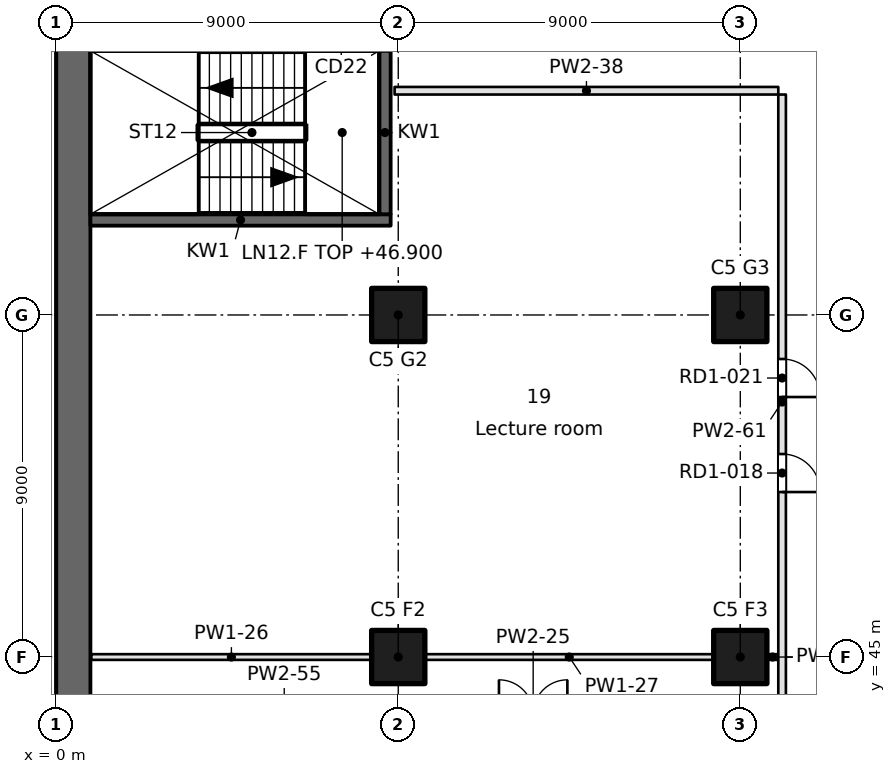
"""IFC4 building model, lengths in metres.
Left out: names, types, materials, properties, quantities, classifications, styles, units other than length and angle.
Written with IfcOpenShell. Run it as: python <this file> out.ifc"""

import sys

from ifc_helpers import new_model, si_unit, direction, frame, frame_2d, origin, origin_2d, place, context, subcontext, project, spatial, rectangle, extrude, element, fill, save


model = new_model("IFC4")
c1 = context("Model", 3, precision=1e-05, world=origin(), true_north=direction((0.0, 1.0)))
c2 = subcontext(c1, "Body", "Model", "MODEL_VIEW")
j1 = project(units=[si_unit("LENGTHUNIT", "METRE"), si_unit("PLANEANGLEUNIT", "RADIAN")], contexts=[c1])
p1 = place(None, origin())
s1 = spatial("IfcSite", under=j1, at=p1, CompositionType="ELEMENT")
p2 = place(p1, origin())
s2 = spatial("IfcBuilding", under=s1, at=p2, CompositionType="ELEMENT")
p3 = place(p2, frame((0.0, 0.0, 46.9)))
s3 = spatial("IfcBuildingStorey", under=s2, at=p3, CompositionType="ELEMENT", Elevation=46.9)
for number, where, z_axis, x_axis in (
    (1, (9.0, 45.0, 0.0), (0.0, 0.0, 1.0), (1.0, 0.0, 0.0)),
    (2, (9.0, 54.0, 0.0), (0.0, 0.0, 1.0), (1.0, 0.0, 0.0)),
    (3, (18.0, 45.0, 0.0), (0.0, 0.0, 1.0), (1.0, 0.0, 0.0)),
    (4, (18.0, 54.0, 0.0), (0.0, 0.0, 1.0), (1.0, 0.0, 0.0)),
):
    element("IfcColumn", number, at=place(p3, frame(where, z_axis=z_axis, x_axis=x_axis)), inside=s3, PredefinedType="COLUMN", context=c2, shape_type="SweptSolid", body=[
        extrude(rectangle(XDim=1.4, YDim=1.4, at=origin_2d()), origin(), (0.0, 0.0, 1.0), 3.7),
    ])
p4 = place(p3, frame((0.45, 94.5, 0.0), z_axis=(0.0, 0.0, 1.0), x_axis=(0.0, -1.0, 0.0)))
e5 = element("IfcWall", 5, at=p4, inside=s3, PredefinedType="SHEAR", context=c2, shape_type="SweptSolid", body=[
    extrude(rectangle(XDim=66.187, YDim=0.9, at=frame_2d((33.094, 0.0))), origin(), (0.0, 0.0, 1.0), 3.7),
])
p5 = place(p3, frame((0.9, 56.5, -0.4), z_axis=(0.0, 0.0, 1.0), x_axis=(1.0, 0.0, 0.0)))
e6 = element("IfcWall", 6, at=p5, inside=s3, PredefinedType="SOLIDWALL", context=c2, shape_type="SweptSolid", body=[
    extrude(rectangle(XDim=7.9, YDim=0.3, at=frame_2d((3.95, 0.0))), origin(), (0.0, 0.0, 1.0), 3.7),
])
p6 = place(p3, frame((8.65, 56.65, -0.4), z_axis=(0.0, 0.0, 1.0), x_axis=(0.0, 1.0, 0.0)))
e7 = element("IfcWall", 7, at=p6, inside=s3, PredefinedType="SOLIDWALL", context=c2, shape_type="SweptSolid", body=[
    extrude(rectangle(XDim=4.3, YDim=0.3, at=frame_2d((2.15, 0.0))), origin(), (0.0, 0.0, 1.0), 3.7),
])
p7 = place(p3, frame((0.92, 45.0, 0.0), z_axis=(0.0, 0.0, 1.0), x_axis=(1.0, 0.0, 0.0)))
e8 = element("IfcWall", 8, at=p7, inside=s3, PredefinedType="PARTITIONING", context=c2, shape_type="SweptSolid", body=[
    extrude(rectangle(XDim=7.38, YDim=0.15, at=frame_2d((3.69, 0.0))), origin(), (0.0, 0.0, 1.0), 3.3),
])
p8 = place(p3, frame((9.7, 45.0, 0.0), z_axis=(0.0, 0.0, 1.0), x_axis=(1.0, 0.0, 0.0)))
e9 = element("IfcWall", 9, at=p8, inside=s3, PredefinedType="PARTITIONING", context=c2, shape_type="SweptSolid", body=[
    extrude(rectangle(XDim=7.6, YDim=0.15, at=frame_2d((3.8, 0.0))), origin(), (0.0, 0.0, 1.0), 3.3),
])
p9 = place(p3, frame((18.7, 45.0, 0.0), z_axis=(0.0, 0.0, 1.0), x_axis=(1.0, 0.0, 0.0)))
e10 = element("IfcWall", 10, at=p9, inside=s3, PredefinedType="PARTITIONING", context=c2, shape_type="SweptSolid", body=[
    extrude(rectangle(XDim=0.3, YDim=0.15, at=frame_2d((0.15, 0.0))), origin(), (0.0, 0.0, 1.0), 3.3),
])
p10 = place(p3, frame((19.0, 59.9, 0.0), z_axis=(0.0, 0.0, 1.0), x_axis=(-1.0, 0.0, 0.0)))
e11 = element("IfcWall", 11, at=p10, inside=s3, PredefinedType="PARTITIONING", context=c2, shape_type="SweptSolid", body=[
    extrude(rectangle(XDim=10.096, YDim=0.2, at=frame_2d((5.048, 0.0))), origin(), (0.0, 0.0, 1.0), 3.3),
])
p11 = place(p3, frame((19.1, 43.618, 0.0), z_axis=(0.0, 0.0, 1.0), x_axis=(0.0, 1.0, 0.0)))
e12 = element("IfcWall", 12, at=p11, inside=s3, PredefinedType="PARTITIONING", context=c2, shape_type="SweptSolid", body=[
    extrude(rectangle(XDim=16.182, YDim=0.2, at=frame_2d((8.091, 0.0))), origin(), (0.0, 0.0, 1.0), 3.3),
])
p12 = place(p11, frame((5.723, 0.0, 0.0)))
e13 = element("IfcOpeningElement", 13, at=p12, cuts=e12, PredefinedType="OPENING", context=c2, shape_type="SweptSolid", body=[
    extrude(rectangle(XDim=1.0, YDim=2.1, at=frame_2d((0.5, 1.05))), frame((0.0, 0.1, 0.0), z_axis=(0.0, -1.0, 0.0), x_axis=(1.0, 0.0, 0.0)), (0.0, 0.0, 1.0), 0.2),
])
p13 = place(p11, frame((8.223, 0.0, 0.0)))
e14 = element("IfcOpeningElement", 14, at=p13, cuts=e12, PredefinedType="OPENING", context=c2, shape_type="SweptSolid", body=[
    extrude(rectangle(XDim=1.0, YDim=2.1, at=frame_2d((0.5, 1.05))), frame((0.0, 0.1, 0.0), z_axis=(0.0, -1.0, 0.0), x_axis=(1.0, 0.0, 0.0)), (0.0, 0.0, 1.0), 0.2),
])
p14 = place(p12, frame((1.0, 0.0, 0.0), z_axis=(0.0, 0.0, 1.0), x_axis=(-1.0, 0.0, 0.0)))
e15 = element("IfcDoor", 15, at=p14, inside=s3, OperationType="SINGLE_SWING_RIGHT", PredefinedType="DOOR", context=c2, shape_type="SweptSolid", body=[
    extrude(rectangle(XDim=1.0, YDim=2.1, at=frame_2d((0.5, 1.05))), frame((0.0, 0.025, 0.0), z_axis=(0.0, -1.0, 0.0), x_axis=(1.0, 0.0, 0.0)), (0.0, 0.0, 1.0), 0.05),
])
fill(e13, e15)
p15 = place(p13, frame((1.0, 0.0, 0.0), z_axis=(0.0, 0.0, 1.0), x_axis=(-1.0, 0.0, 0.0)))
e16 = element("IfcDoor", 16, at=p15, inside=s3, OperationType="SINGLE_SWING_RIGHT", PredefinedType="DOOR", context=c2, shape_type="SweptSolid", body=[
    extrude(rectangle(XDim=1.0, YDim=2.1, at=frame_2d((0.5, 1.05))), frame((0.0, 0.025, 0.0), z_axis=(0.0, -1.0, 0.0), x_axis=(1.0, 0.0, 0.0)), (0.0, 0.0, 1.0), 0.05),
])
fill(e14, e16)
save(model, sys.argv[1])
